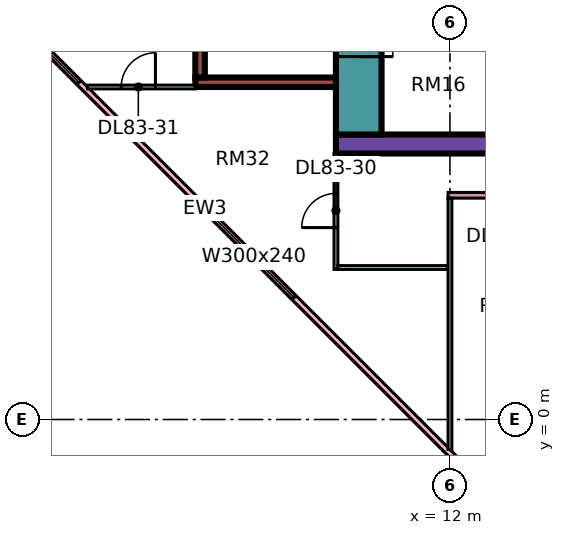
"""IFC4 building model, lengths in metres.
Left out: names, types, materials, properties, quantities, classifications, styles, units other than length and angle.
Written with IfcOpenShell. Run it as: python <this file> out.ifc"""

import sys

from ifc_helpers import new_model, si_unit, direction, frame, frame_2d, origin, place, context, subcontext, project, spatial, rectangle, extrude, element, fill, save


model = new_model("IFC4")
c1 = context("Model", 3, precision=1e-05, world=origin(), true_north=direction((0.0, 1.0)))
c2 = subcontext(c1, "Body", "Model", "MODEL_VIEW")
j1 = project(units=[si_unit("LENGTHUNIT", "METRE"), si_unit("PLANEANGLEUNIT", "RADIAN")], contexts=[c1])
p1 = place(None, origin())
s1 = spatial("IfcSite", under=j1, at=p1, CompositionType="ELEMENT")
p2 = place(p1, origin())
s2 = spatial("IfcBuilding", under=s1, at=p2, CompositionType="ELEMENT")
p3 = place(p2, frame((0.0, 0.0, 357.65)))
s3 = spatial("IfcBuildingStorey", under=s2, at=p3, CompositionType="ELEMENT", Elevation=357.65)
p4 = place(p3, frame((9.0, 7.25, 0.0), z_axis=(0.0, 0.0, 1.0), x_axis=(1.0, 0.0, 0.0)))
e1 = element("IfcWall", 1, at=p4, inside=s3, PredefinedType="SHEAR", context=c2, shape_type="SweptSolid", body=[
    extrude(rectangle(XDim=25.0, YDim=0.5, at=frame_2d((12.5, 0.0))), origin(), (0.0, 0.0, 1.0), 3.75),
])
p5 = place(p3, frame((9.6, 7.5, 0.0), z_axis=(0.0, 0.0, 1.0), x_axis=(0.0, 1.0, 0.0)))
e2 = element("IfcWall", 2, at=p5, inside=s3, PredefinedType="SHEAR", context=c2, shape_type="SweptSolid", body=[
    extrude(rectangle(XDim=12.0, YDim=1.2, at=frame_2d((6.0, 0.0))), origin(), (0.0, 0.0, 1.0), 3.75),
])
p6 = place(p5, frame((4.375, 0.0, 0.0)))
e3 = element("IfcOpeningElement", 3, at=p6, cuts=e2, PredefinedType="OPENING", context=c2, shape_type="SweptSolid", body=[
    extrude(rectangle(XDim=1.1, YDim=2.2, at=frame_2d((0.55, 1.1))), frame((0.0, 0.61, 0.0), z_axis=(0.0, -1.0, 0.0), x_axis=(1.0, 0.0, 0.0)), (0.0, 0.0, 1.0), 1.22),
])
p7 = place(p5, frame((6.875, 0.0, 0.0)))
e4 = element("IfcOpeningElement", 4, at=p7, cuts=e2, PredefinedType="OPENING", context=c2, shape_type="SweptSolid", body=[
    extrude(rectangle(XDim=1.1, YDim=2.2, at=frame_2d((0.55, 1.1))), frame((0.0, 0.61, 0.0), z_axis=(0.0, -1.0, 0.0), x_axis=(1.0, 0.0, 0.0)), (0.0, 0.0, 1.0), 1.22),
])
p8 = place(p5, frame((9.85, 0.0, 0.0)))
e5 = element("IfcOpeningElement", 5, at=p8, cuts=e2, PredefinedType="OPENING", context=c2, shape_type="SweptSolid", body=[
    extrude(rectangle(XDim=1.1, YDim=2.2, at=frame_2d((0.55, 1.1))), frame((0.0, 0.61, 0.0), z_axis=(0.0, -1.0, 0.0), x_axis=(1.0, 0.0, 0.0)), (0.0, 0.0, 1.0), 1.22),
])
p9 = place(p5, frame((2.05, 0.0, 0.0)))
e6 = element("IfcOpeningElement", 6, at=p9, cuts=e2, PredefinedType="OPENING", context=c2, shape_type="SweptSolid", body=[
    extrude(rectangle(XDim=0.9, YDim=2.1, at=frame_2d((0.45, 1.05))), frame((0.0, 0.61, 0.0), z_axis=(0.0, -1.0, 0.0), x_axis=(1.0, 0.0, 0.0)), (0.0, 0.0, 1.0), 1.22),
])
p10 = place(p3, frame((5.3, 8.875, 0.0), z_axis=(0.0, 0.0, 1.0), x_axis=(1.0, 0.0, 0.0)))
e7 = element("IfcWall", 7, at=p10, inside=s3, PredefinedType="SHEAR", context=c2, shape_type="SweptSolid", body=[
    extrude(rectangle(XDim=3.7, YDim=0.25, at=frame_2d((1.85, 0.0))), origin(), (0.0, 0.0, 1.0), 3.75),
])
p11 = place(p3, frame((5.425, 9.0, 0.0), z_axis=(0.0, 0.0, 1.0), x_axis=(0.0, 1.0, 0.0)))
e8 = element("IfcWall", 8, at=p11, inside=s3, PredefinedType="SHEAR", context=c2, shape_type="SweptSolid", body=[
    extrude(rectangle(XDim=4.0, YDim=0.25, at=frame_2d((2.0, 0.0))), origin(), (0.0, 0.0, 1.0), 3.75),
])
p12 = place(p3, frame((-1.447, 12.553, 0.0), z_axis=(0.0, 0.0, 1.0), x_axis=(0.707106781187, -0.707106781187, 0.0)))
e9 = element("IfcWall", 9, at=p12, inside=s3, PredefinedType="SOLIDWALL", context=c2, shape_type="SweptSolid", body=[
    extrude(rectangle(XDim=19.799, YDim=0.15, at=frame_2d((9.899, 0.0))), origin(), (0.0, 0.0, 1.0), 3.35),
])
p13 = place(p12, frame((2.212, 0.0, 0.45)))
e10 = element("IfcOpeningElement", 10, at=p13, cuts=e9, PredefinedType="OPENING", context=c2, shape_type="SweptSolid", body=[
    extrude(rectangle(XDim=3.0, YDim=2.4, at=frame_2d((1.5, 1.2))), frame((0.0, 0.085, 0.0), z_axis=(0.0, -1.0, 0.0), x_axis=(1.0, 0.0, 0.0)), (0.0, 0.0, 1.0), 0.17),
])
p14 = place(p12, frame((10.216, 0.0, 0.45)))
e11 = element("IfcOpeningElement", 11, at=p14, cuts=e9, PredefinedType="OPENING", context=c2, shape_type="SweptSolid", body=[
    extrude(rectangle(XDim=3.0, YDim=2.4, at=frame_2d((1.5, 1.2))), frame((0.0, 0.085, 0.0), z_axis=(0.0, -1.0, 0.0), x_axis=(1.0, 0.0, 0.0)), (0.0, 0.0, 1.0), 0.17),
])
p15 = place(p3, frame((2.461, 8.75, 0.0), z_axis=(0.0, 0.0, 1.0), x_axis=(1.0, 0.0, 0.0)))
e12 = element("IfcWall", 12, at=p15, inside=s3, PredefinedType="PARTITIONING", context=c2, shape_type="SweptSolid", body=[
    extrude(rectangle(XDim=2.839, YDim=0.1, at=frame_2d((1.419, 0.0))), origin(), (0.0, 0.0, 1.0), 3.35),
])
p16 = place(p15, frame((0.889, 0.0, 0.0)))
e13 = element("IfcOpeningElement", 13, at=p16, cuts=e12, PredefinedType="OPENING", context=c2, shape_type="SweptSolid", body=[
    extrude(rectangle(XDim=0.9, YDim=2.1, at=frame_2d((0.45, 1.05))), frame((0.0, 0.06, 0.0), z_axis=(0.0, -1.0, 0.0), x_axis=(1.0, 0.0, 0.0)), (0.0, 0.0, 1.0), 0.12),
])
p17 = place(p3, frame((9.0, 3.95, 0.0), z_axis=(0.0, 0.0, 1.0), x_axis=(0.0, 1.0, 0.0)))
e14 = element("IfcWall", 14, at=p17, inside=s3, PredefinedType="PARTITIONING", context=c2, shape_type="SweptSolid", body=[
    extrude(rectangle(XDim=3.05, YDim=0.1, at=frame_2d((1.525, 0.0))), origin(), (0.0, 0.0, 1.0), 3.35),
])
p18 = place(p17, frame((1.1, 0.0, 0.0)))
e15 = element("IfcOpeningElement", 15, at=p18, cuts=e14, PredefinedType="OPENING", context=c2, shape_type="SweptSolid", body=[
    extrude(rectangle(XDim=0.9, YDim=2.1, at=frame_2d((0.45, 1.05))), frame((0.0, 0.06, 0.0), z_axis=(0.0, -1.0, 0.0), x_axis=(1.0, 0.0, 0.0)), (0.0, 0.0, 1.0), 0.12),
])
p19 = place(p3, frame((9.05, 4.0, 0.0), z_axis=(0.0, 0.0, 1.0), x_axis=(1.0, 0.0, 0.0)))
e16 = element("IfcWall", 16, at=p19, inside=s3, PredefinedType="PARTITIONING", context=c2, shape_type="SweptSolid", body=[
    extrude(rectangle(XDim=2.9, YDim=0.1, at=frame_2d((1.45, 0.0))), origin(), (0.0, 0.0, 1.0), 3.35),
])
p20 = place(p3, frame((11.95, 5.9, 0.0), z_axis=(0.0, 0.0, 1.0), x_axis=(1.0, 0.0, 0.0)))
e17 = element("IfcWall", 17, at=p20, inside=s3, PredefinedType="PARTITIONING", context=c2, shape_type="SweptSolid", body=[
    extrude(rectangle(XDim=21.1, YDim=0.15, at=frame_2d((10.55, 0.0))), origin(), (0.0, 0.0, 1.0), 3.35),
])
p21 = place(p20, frame((1.1, 0.0, 0.0)))
e18 = element("IfcOpeningElement", 18, at=p21, cuts=e17, PredefinedType="OPENING", context=c2, shape_type="SweptSolid", body=[
    extrude(rectangle(XDim=0.9, YDim=2.1, at=frame_2d((0.45, 1.05))), frame((0.0, 0.085, 0.0), z_axis=(0.0, -1.0, 0.0), x_axis=(1.0, 0.0, 0.0)), (0.0, 0.0, 1.0), 0.17),
])
p22 = place(p20, frame((4.1, 0.0, 0.0)))
e19 = element("IfcOpeningElement", 19, at=p22, cuts=e17, PredefinedType="OPENING", context=c2, shape_type="SweptSolid", body=[
    extrude(rectangle(XDim=0.9, YDim=2.1, at=frame_2d((0.45, 1.05))), frame((0.0, 0.085, 0.0), z_axis=(0.0, -1.0, 0.0), x_axis=(1.0, 0.0, 0.0)), (0.0, 0.0, 1.0), 0.17),
])
p23 = place(p20, frame((10.1, 0.0, 0.0)))
e20 = element("IfcOpeningElement", 20, at=p23, cuts=e17, PredefinedType="OPENING", context=c2, shape_type="SweptSolid", body=[
    extrude(rectangle(XDim=0.9, YDim=2.1, at=frame_2d((0.45, 1.05))), frame((0.0, 0.085, 0.0), z_axis=(0.0, -1.0, 0.0), x_axis=(1.0, 0.0, 0.0)), (0.0, 0.0, 1.0), 0.17),
])
p24 = place(p3, frame((12.0, -0.788, 0.0), z_axis=(0.0, 0.0, 1.0), x_axis=(0.0, 1.0, 0.0)))
e21 = element("IfcWall", 21, at=p24, inside=s3, PredefinedType="PARTITIONING", context=c2, shape_type="SweptSolid", body=[
    extrude(rectangle(XDim=6.613, YDim=0.1, at=frame_2d((3.306, 0.0))), origin(), (0.0, 0.0, 1.0), 3.35),
])
p25 = place(p13, origin())
e22 = element("IfcWindow", 22, at=p25, inside=s3, PartitioningType="SINGLE_PANEL", PredefinedType="WINDOW", context=c2, shape_type="SweptSolid", body=[
    extrude(rectangle(XDim=3.0, YDim=2.4, at=frame_2d((1.5, 1.2))), frame((0.0, 0.03, 0.0), z_axis=(0.0, -1.0, 0.0), x_axis=(1.0, 0.0, 0.0)), (0.0, 0.0, 1.0), 0.06),
])
fill(e10, e22)
p26 = place(p14, origin())
e23 = element("IfcWindow", 23, at=p26, inside=s3, PartitioningType="SINGLE_PANEL", PredefinedType="WINDOW", context=c2, shape_type="SweptSolid", body=[
    extrude(rectangle(XDim=3.0, YDim=2.4, at=frame_2d((1.5, 1.2))), frame((0.0, 0.03, 0.0), z_axis=(0.0, -1.0, 0.0), x_axis=(1.0, 0.0, 0.0)), (0.0, 0.0, 1.0), 0.06),
])
fill(e11, e23)
p27 = place(p9, frame((0.9, 0.0, 0.0), z_axis=(0.0, 0.0, 1.0), x_axis=(-1.0, 0.0, 0.0)))
e24 = element("IfcDoor", 24, at=p27, inside=s3, OperationType="SINGLE_SWING_LEFT", PredefinedType="DOOR", context=c2, shape_type="SweptSolid", body=[
    extrude(rectangle(XDim=0.9, YDim=2.1, at=frame_2d((0.45, 1.05))), frame((0.0, 0.025, 0.0), z_axis=(0.0, -1.0, 0.0), x_axis=(1.0, 0.0, 0.0)), (0.0, 0.0, 1.0), 0.05),
])
fill(e6, e24)
p28 = place(p18, origin())
e25 = element("IfcDoor", 25, at=p28, inside=s3, OperationType="SINGLE_SWING_LEFT", PredefinedType="DOOR", context=c2, shape_type="SweptSolid", body=[
    extrude(rectangle(XDim=0.9, YDim=2.1, at=frame_2d((0.45, 1.05))), frame((0.0, 0.025, 0.0), z_axis=(0.0, -1.0, 0.0), x_axis=(1.0, 0.0, 0.0)), (0.0, 0.0, 1.0), 0.05),
])
fill(e15, e25)
p29 = place(p16, frame((0.9, 0.0, 0.0), z_axis=(0.0, 0.0, 1.0), x_axis=(-1.0, 0.0, 0.0)))
e26 = element("IfcDoor", 26, at=p29, inside=s3, OperationType="SINGLE_SWING_RIGHT", PredefinedType="DOOR", context=c2, shape_type="SweptSolid", body=[
    extrude(rectangle(XDim=0.9, YDim=2.1, at=frame_2d((0.45, 1.05))), frame((0.0, 0.025, 0.0), z_axis=(0.0, -1.0, 0.0), x_axis=(1.0, 0.0, 0.0)), (0.0, 0.0, 1.0), 0.05),
])
fill(e13, e26)
save(model, sys.argv[1])
